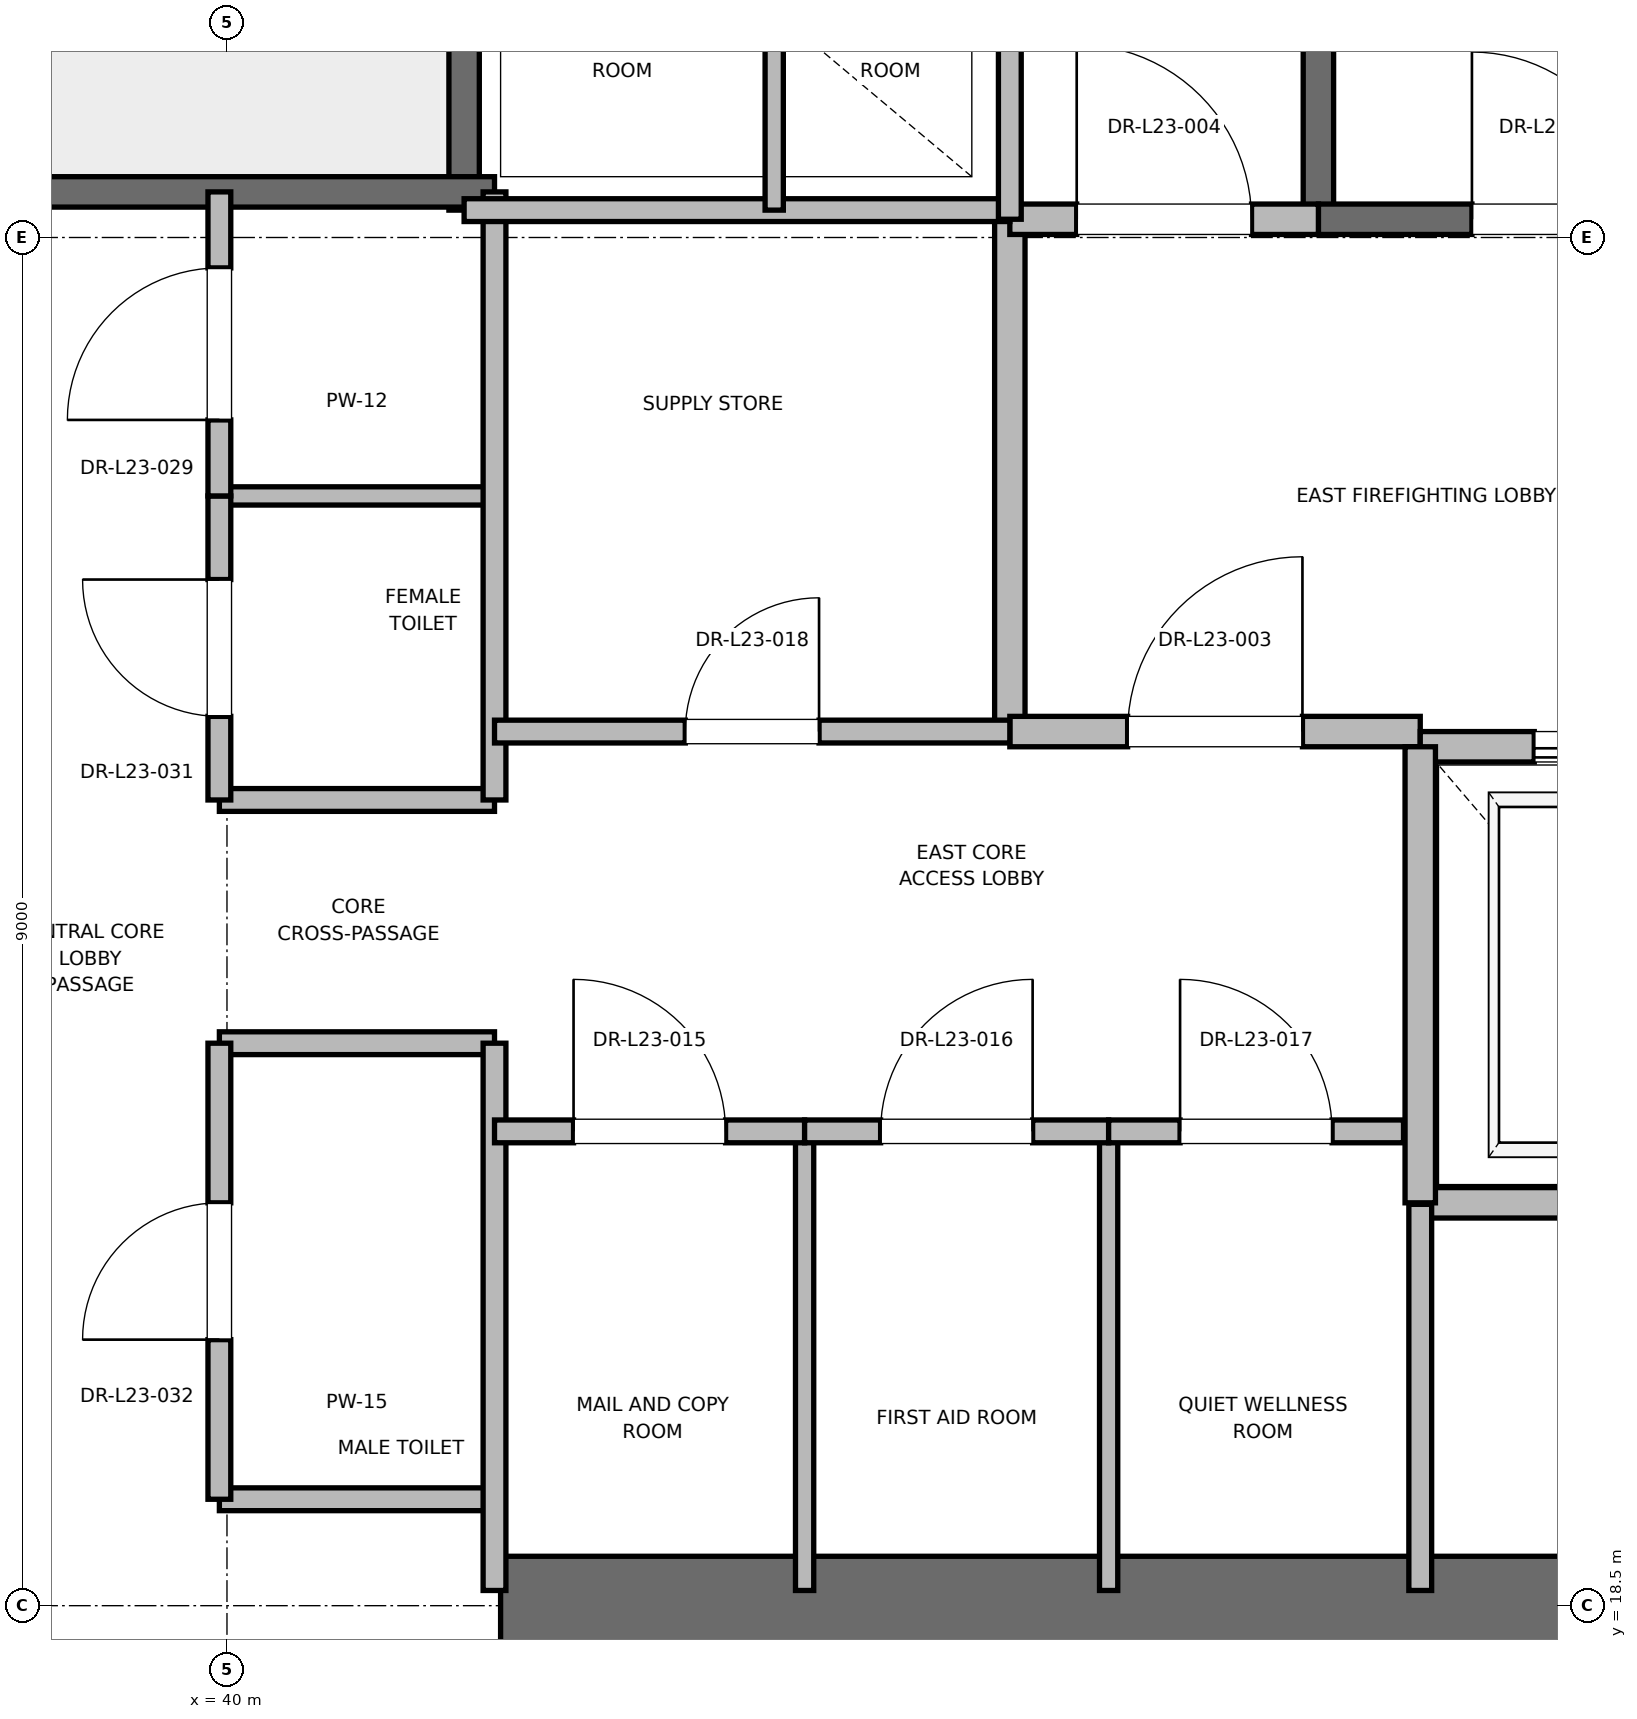
"""IFC4 building model, lengths in metres.
Left out: names, types, materials, properties, quantities, classifications, styles, units other than length and angle.
Written with IfcOpenShell. Run it as: python <this file> out.ifc"""

import sys

from ifc_helpers import new_model, si_unit, direction, frame, frame_2d, origin, place, context, subcontext, project, spatial, rectangle, extrude, element, fill, save


model = new_model("IFC4")
c1 = context("Model", 3, precision=1e-05, world=origin(), true_north=direction((0.0, 1.0)))
c2 = subcontext(c1, "Body", "Model", "MODEL_VIEW")
j1 = project(units=[si_unit("LENGTHUNIT", "METRE"), si_unit("PLANEANGLEUNIT", "RADIAN")], contexts=[c1])
p1 = place(None, origin())
s1 = spatial("IfcSite", under=j1, at=p1, CompositionType="ELEMENT")
p2 = place(p1, origin())
s2 = spatial("IfcBuilding", under=s1, at=p2, CompositionType="ELEMENT")
p3 = place(p2, frame((0.0, 0.0, 99.6)))
s3 = spatial("IfcBuildingStorey", under=s2, at=p3, CompositionType="ELEMENT", Elevation=99.6)
p4 = place(p3, frame((41.8, 18.5, 0.0), z_axis=(0.0, 0.0, 1.0), x_axis=(1.0, 0.0, 0.0)))
e1 = element("IfcWall", 1, at=p4, inside=s3, PredefinedType="SHEAR", context=c2, shape_type="SweptSolid", body=[
    extrude(rectangle(XDim=9.2, YDim=0.65, at=frame_2d((4.6, 0.0))), origin(), (0.0, 0.0, 1.0), 3.76),
])
p5 = place(p3, frame((47.18, 27.62, 0.0), z_axis=(0.0, 0.0, 1.0), x_axis=(0.0, 1.0, 0.0)))
e2 = element("IfcWall", 2, at=p5, inside=s3, PredefinedType="SOLIDWALL", context=c2, shape_type="SweptSolid", body=[
    extrude(rectangle(XDim=8.18, YDim=0.2, at=frame_2d((4.09, 0.0))), origin(), (0.0, 0.0, 1.0), 3.76),
])
p6 = place(p3, frame((47.18, 27.62, 0.0), z_axis=(0.0, 0.0, 1.0), x_axis=(1.0, 0.0, 0.0)))
e3 = element("IfcWall", 3, at=p6, inside=s3, PredefinedType="SOLIDWALL", context=c2, shape_type="SweptSolid", body=[
    extrude(rectangle(XDim=3.12, YDim=0.2, at=frame_2d((1.56, 0.0))), origin(), (0.0, 0.0, 1.0), 3.76),
])
p7 = place(p6, frame((1.01, 0.0, 0.0)))
e4 = element("IfcOpeningElement", 4, at=p7, cuts=e3, PredefinedType="OPENING", context=c2, shape_type="SweptSolid", body=[
    extrude(rectangle(XDim=1.1, YDim=2.15, at=frame_2d((0.55, 1.075))), frame((0.0, 0.1, 0.0), z_axis=(0.0, -1.0, 0.0), x_axis=(1.0, 0.0, 0.0)), (0.0, 0.0, 1.0), 0.2),
])
p8 = place(p3, frame((41.56, 27.68, 0.0), z_axis=(0.0, 0.0, 1.0), x_axis=(0.0, 1.0, 0.0)))
e5 = element("IfcWall", 5, at=p8, inside=s3, PredefinedType="SOLIDWALL", context=c2, shape_type="SweptSolid", body=[
    extrude(rectangle(XDim=8.57, YDim=0.2, at=frame_2d((4.285, 0.0))), origin(), (0.0, 0.0, 1.0), 3.76),
])
p9 = place(p3, frame((38.44, 27.8, 0.0), z_axis=(0.0, 0.0, 1.0), x_axis=(1.0, 0.0, 0.0)))
e6 = element("IfcWall", 6, at=p9, inside=s3, PredefinedType="SOLIDWALL", context=c2, shape_type="SweptSolid", body=[
    extrude(rectangle(XDim=3.32, YDim=0.2, at=frame_2d((1.66, 0.0))), origin(), (0.0, 0.0, 1.0), 3.76),
])
p10 = place(p3, frame((45.15, 24.25, 0.0), z_axis=(0.0, 0.0, 1.0), x_axis=(0.0, 1.0, 0.0)))
e7 = element("IfcWall", 7, at=p10, inside=s3, PredefinedType="PARTITIONING", context=c2, shape_type="SweptSolid", body=[
    extrude(rectangle(XDim=3.37, YDim=0.2, at=frame_2d((1.685, 0.0))), origin(), (0.0, 0.0, 1.0), 3.76),
])
p11 = place(p3, frame((45.15, 24.25, 0.0), z_axis=(0.0, 0.0, 1.0), x_axis=(1.0, 0.0, 0.0)))
e8 = element("IfcWall", 8, at=p11, inside=s3, PredefinedType="PARTITIONING", context=c2, shape_type="SweptSolid", body=[
    extrude(rectangle(XDim=2.7, YDim=0.2, at=frame_2d((1.35, 0.0))), origin(), (0.0, 0.0, 1.0), 3.76),
])
p12 = place(p11, frame((0.775, 0.0, 0.0)))
e9 = element("IfcOpeningElement", 9, at=p12, cuts=e8, PredefinedType="OPENING", context=c2, shape_type="SweptSolid", body=[
    extrude(rectangle(XDim=1.15, YDim=2.2, at=frame_2d((0.575, 1.1))), frame((0.0, 0.1, 0.0), z_axis=(0.0, -1.0, 0.0), x_axis=(1.0, 0.0, 0.0)), (0.0, 0.0, 1.0), 0.2),
])
p13 = place(p3, frame((45.15, 27.62, 0.0), z_axis=(0.0, 0.0, 1.0), x_axis=(1.0, 0.0, 0.0)))
e10 = element("IfcWall", 10, at=p13, inside=s3, PredefinedType="PARTITIONING", context=c2, shape_type="SweptSolid", body=[
    extrude(rectangle(XDim=2.03, YDim=0.2, at=frame_2d((1.015, 0.0))), origin(), (0.0, 0.0, 1.0), 3.76),
])
p14 = place(p13, frame((0.44, 0.0, 0.0)))
e11 = element("IfcOpeningElement", 11, at=p14, cuts=e10, PredefinedType="OPENING", context=c2, shape_type="SweptSolid", body=[
    extrude(rectangle(XDim=1.15, YDim=2.2, at=frame_2d((0.575, 1.1))), frame((0.0, 0.1, 0.0), z_axis=(0.0, -1.0, 0.0), x_axis=(1.0, 0.0, 0.0)), (0.0, 0.0, 1.0), 0.2),
])
p15 = place(p3, frame((47.85, 21.15, 0.0), z_axis=(0.0, 0.0, 1.0), x_axis=(1.0, 0.0, 0.0)))
e12 = element("IfcWall", 12, at=p15, inside=s3, PredefinedType="SOLIDWALL", context=c2, shape_type="SweptSolid", body=[
    extrude(rectangle(XDim=2.6, YDim=0.2, at=frame_2d((1.3, 0.0))), origin(), (0.0, 0.0, 1.0), 3.76),
])
p16 = place(p3, frame((50.45, 24.15, 0.0), z_axis=(0.0, 0.0, 1.0), x_axis=(-1.0, 0.0, 0.0)))
e13 = element("IfcWall", 13, at=p16, inside=s3, PredefinedType="SOLIDWALL", context=c2, shape_type="SweptSolid", body=[
    extrude(rectangle(XDim=2.6, YDim=0.2, at=frame_2d((1.3, 0.0))), origin(), (0.0, 0.0, 1.0), 2.54),
])
p17 = place(p16, frame((0.75, 0.0, 0.0)))
e14 = element("IfcOpeningElement", 14, at=p17, cuts=e13, PredefinedType="OPENING", context=c2, shape_type="SweptSolid", body=[
    extrude(rectangle(XDim=1.1, YDim=2.2, at=frame_2d((0.55, 1.1))), frame((0.0, 0.1, 0.0), z_axis=(0.0, -1.0, 0.0), x_axis=(1.0, 0.0, 0.0)), (0.0, 0.0, 1.0), 0.2),
])
p18 = place(p3, frame((47.85, 24.15, 0.0), z_axis=(0.0, 0.0, 1.0), x_axis=(0.0, -1.0, 0.0)))
e15 = element("IfcWall", 15, at=p18, inside=s3, PredefinedType="SOLIDWALL", context=c2, shape_type="SweptSolid", body=[
    extrude(rectangle(XDim=3.0, YDim=0.2, at=frame_2d((1.5, 0.0))), origin(), (0.0, 0.0, 1.0), 3.76),
])
for number, where, z_axis, x_axis in (
    (16, (39.95, 19.2, 0.0), (0.0, 0.0, 1.0), (1.0, 0.0, 0.0)),
    (17, (39.95, 22.2, 0.0), (0.0, 0.0, 1.0), (1.0, 0.0, 0.0)),
    (18, (39.95, 23.8, 0.0), (0.0, 0.0, 1.0), (1.0, 0.0, 0.0)),
):
    element("IfcWall", number, at=place(p3, frame(where, z_axis=z_axis, x_axis=x_axis)), inside=s3, PredefinedType="PARTITIONING", context=c2, shape_type="SweptSolid", body=[
        extrude(rectangle(XDim=1.81, YDim=0.15, at=frame_2d((0.905, 0.0))), origin(), (0.0, 0.0, 1.0), 2.85),
    ])
p19 = place(p3, frame((39.95, 25.8, 0.0), z_axis=(0.0, 0.0, 1.0), x_axis=(1.0, 0.0, 0.0)))
e19 = element("IfcWall", 19, at=p19, inside=s3, PredefinedType="PARTITIONING", context=c2, shape_type="SweptSolid", body=[
    extrude(rectangle(XDim=1.81, YDim=0.12, at=frame_2d((0.905, 0.0))), origin(), (0.0, 0.0, 1.0), 2.85),
])
p20 = place(p3, frame((41.76, 18.6, 0.0), z_axis=(0.0, 0.0, 1.0), x_axis=(0.0, 1.0, 0.0)))
e20 = element("IfcWall", 20, at=p20, inside=s3, PredefinedType="PARTITIONING", context=c2, shape_type="SweptSolid", body=[
    extrude(rectangle(XDim=3.6, YDim=0.15, at=frame_2d((1.8, 0.0))), origin(), (0.0, 0.0, 1.0), 2.54),
])
p21 = place(p3, frame((41.76, 23.8, 0.0), z_axis=(0.0, 0.0, 1.0), x_axis=(0.0, 1.0, 0.0)))
e21 = element("IfcWall", 21, at=p21, inside=s3, PredefinedType="PARTITIONING", context=c2, shape_type="SweptSolid", body=[
    extrude(rectangle(XDim=4.0, YDim=0.15, at=frame_2d((2.0, 0.0))), origin(), (0.0, 0.0, 1.0), 2.85),
])
p22 = place(p3, frame((39.95, 19.2, 0.0), z_axis=(0.0, 0.0, 1.0), x_axis=(0.0, 1.0, 0.0)))
e22 = element("IfcWall", 22, at=p22, inside=s3, PredefinedType="PARTITIONING", context=c2, shape_type="SweptSolid", body=[
    extrude(rectangle(XDim=3.0, YDim=0.15, at=frame_2d((1.5, 0.0))), origin(), (0.0, 0.0, 1.0), 2.85),
])
p23 = place(p22, frame((1.05, 0.0, 0.0)))
e23 = element("IfcOpeningElement", 23, at=p23, cuts=e22, PredefinedType="OPENING", context=c2, shape_type="SweptSolid", body=[
    extrude(rectangle(XDim=0.9, YDim=2.1, at=frame_2d((0.45, 1.05))), frame((0.0, 0.075, 0.0), z_axis=(0.0, -1.0, 0.0), x_axis=(1.0, 0.0, 0.0)), (0.0, 0.0, 1.0), 0.15),
])
p24 = place(p3, frame((39.95, 23.8, 0.0), z_axis=(0.0, 0.0, 1.0), x_axis=(0.0, 1.0, 0.0)))
e24 = element("IfcWall", 24, at=p24, inside=s3, PredefinedType="PARTITIONING", context=c2, shape_type="SweptSolid", body=[
    extrude(rectangle(XDim=2.0, YDim=0.15, at=frame_2d((1.0, 0.0))), origin(), (0.0, 0.0, 1.0), 2.85),
])
p25 = place(p24, frame((0.55, 0.0, 0.0)))
e25 = element("IfcOpeningElement", 25, at=p25, cuts=e24, PredefinedType="OPENING", context=c2, shape_type="SweptSolid", body=[
    extrude(rectangle(XDim=0.9, YDim=2.1, at=frame_2d((0.45, 1.05))), frame((0.0, 0.075, 0.0), z_axis=(0.0, -1.0, 0.0), x_axis=(1.0, 0.0, 0.0)), (0.0, 0.0, 1.0), 0.15),
])
p26 = place(p3, frame((39.95, 25.8, 0.0), z_axis=(0.0, 0.0, 1.0), x_axis=(0.0, 1.0, 0.0)))
e26 = element("IfcWall", 26, at=p26, inside=s3, PredefinedType="PARTITIONING", context=c2, shape_type="SweptSolid", body=[
    extrude(rectangle(XDim=2.0, YDim=0.15, at=frame_2d((1.0, 0.0))), origin(), (0.0, 0.0, 1.0), 2.85),
])
p27 = place(p26, frame((0.5, 0.0, 0.0)))
e27 = element("IfcOpeningElement", 27, at=p27, cuts=e26, PredefinedType="OPENING", context=c2, shape_type="SweptSolid", body=[
    extrude(rectangle(XDim=1.0, YDim=2.15, at=frame_2d((0.5, 1.075))), frame((0.0, 0.075, 0.0), z_axis=(0.0, -1.0, 0.0), x_axis=(1.0, 0.0, 0.0)), (0.0, 0.0, 1.0), 0.15),
])
p28 = place(p3, frame((41.56, 27.68, 0.0), z_axis=(0.0, 0.0, 1.0), x_axis=(1.0, 0.0, 0.0)))
e28 = element("IfcWall", 28, at=p28, inside=s3, PredefinedType="PARTITIONING", context=c2, shape_type="SweptSolid", body=[
    extrude(rectangle(XDim=3.59, YDim=0.15, at=frame_2d((1.795, 0.0))), origin(), (0.0, 0.0, 1.0), 2.85),
])
p29 = place(p3, frame((47.85, 18.6, 0.0), z_axis=(0.0, 0.0, 1.0), x_axis=(0.0, 1.0, 0.0)))
e29 = element("IfcWall", 29, at=p29, inside=s3, PredefinedType="PARTITIONING", context=c2, shape_type="SweptSolid", body=[
    extrude(rectangle(XDim=2.54, YDim=0.15, at=frame_2d((1.27, 0.0))), origin(), (0.0, 0.0, 1.0), 2.85),
])
for number, where, z_axis, x_axis in (
    (30, (43.8, 18.6, 0.0), (0.0, 0.0, 1.0), (0.0, 1.0, 0.0)),
    (31, (45.8, 18.6, 0.0), (0.0, 0.0, 1.0), (0.0, 1.0, 0.0)),
):
    element("IfcWall", number, at=place(p3, frame(where, z_axis=z_axis, x_axis=x_axis)), inside=s3, PredefinedType="PARTITIONING", context=c2, shape_type="SweptSolid", body=[
        extrude(rectangle(XDim=3.02, YDim=0.12, at=frame_2d((1.51, 0.0))), origin(), (0.0, 0.0, 1.0), 2.85),
    ])
p30 = place(p3, frame((41.76, 21.62, 0.0), z_axis=(0.0, 0.0, 1.0), x_axis=(1.0, 0.0, 0.0)))
e32 = element("IfcWall", 32, at=p30, inside=s3, PredefinedType="PARTITIONING", context=c2, shape_type="SweptSolid", body=[
    extrude(rectangle(XDim=2.04, YDim=0.15, at=frame_2d((1.02, 0.0))), origin(), (0.0, 0.0, 1.0), 2.85),
])
p31 = place(p30, frame((0.52, 0.0, 0.0)))
e33 = element("IfcOpeningElement", 33, at=p31, cuts=e32, PredefinedType="OPENING", context=c2, shape_type="SweptSolid", body=[
    extrude(rectangle(XDim=1.0, YDim=2.15, at=frame_2d((0.5, 1.075))), frame((0.0, 0.075, 0.0), z_axis=(0.0, -1.0, 0.0), x_axis=(1.0, 0.0, 0.0)), (0.0, 0.0, 1.0), 0.15),
])
p32 = place(p3, frame((43.8, 21.62, 0.0), z_axis=(0.0, 0.0, 1.0), x_axis=(1.0, 0.0, 0.0)))
e34 = element("IfcWall", 34, at=p32, inside=s3, PredefinedType="PARTITIONING", context=c2, shape_type="SweptSolid", body=[
    extrude(rectangle(XDim=2.0, YDim=0.15, at=frame_2d((1.0, 0.0))), origin(), (0.0, 0.0, 1.0), 2.85),
])
p33 = place(p32, frame((0.5, 0.0, 0.0)))
e35 = element("IfcOpeningElement", 35, at=p33, cuts=e34, PredefinedType="OPENING", context=c2, shape_type="SweptSolid", body=[
    extrude(rectangle(XDim=1.0, YDim=2.15, at=frame_2d((0.5, 1.075))), frame((0.0, 0.075, 0.0), z_axis=(0.0, -1.0, 0.0), x_axis=(1.0, 0.0, 0.0)), (0.0, 0.0, 1.0), 0.15),
])
p34 = place(p3, frame((45.8, 21.62, 0.0), z_axis=(0.0, 0.0, 1.0), x_axis=(1.0, 0.0, 0.0)))
e36 = element("IfcWall", 36, at=p34, inside=s3, PredefinedType="PARTITIONING", context=c2, shape_type="SweptSolid", body=[
    extrude(rectangle(XDim=1.94, YDim=0.15, at=frame_2d((0.97, 0.0))), origin(), (0.0, 0.0, 1.0), 2.85),
])
p35 = place(p34, frame((0.47, 0.0, 0.0)))
e37 = element("IfcOpeningElement", 37, at=p35, cuts=e36, PredefinedType="OPENING", context=c2, shape_type="SweptSolid", body=[
    extrude(rectangle(XDim=1.0, YDim=2.15, at=frame_2d((0.5, 1.075))), frame((0.0, 0.075, 0.0), z_axis=(0.0, -1.0, 0.0), x_axis=(1.0, 0.0, 0.0)), (0.0, 0.0, 1.0), 0.15),
])
p36 = place(p3, frame((41.76, 24.25, 0.0), z_axis=(0.0, 0.0, 1.0), x_axis=(1.0, 0.0, 0.0)))
e38 = element("IfcWall", 38, at=p36, inside=s3, PredefinedType="PARTITIONING", context=c2, shape_type="SweptSolid", body=[
    extrude(rectangle(XDim=3.39, YDim=0.15, at=frame_2d((1.695, 0.0))), origin(), (0.0, 0.0, 1.0), 2.85),
])
p37 = place(p36, frame((1.255, 0.0, 0.0)))
e39 = element("IfcOpeningElement", 39, at=p37, cuts=e38, PredefinedType="OPENING", context=c2, shape_type="SweptSolid", body=[
    extrude(rectangle(XDim=0.88, YDim=2.1, at=frame_2d((0.44, 1.05))), frame((0.0, 0.075, 0.0), z_axis=(0.0, -1.0, 0.0), x_axis=(1.0, 0.0, 0.0)), (0.0, 0.0, 1.0), 0.15),
])
p38 = place(p3, frame((45.15, 27.62, 0.0), z_axis=(0.0, 0.0, 1.0), x_axis=(0.0, 1.0, 0.0)))
e40 = element("IfcWall", 40, at=p38, inside=s3, PredefinedType="PARTITIONING", context=c2, shape_type="SweptSolid", body=[
    extrude(rectangle(XDim=3.1, YDim=0.15, at=frame_2d((1.55, 0.0))), origin(), (0.0, 0.0, 1.0), 2.85),
])
p39 = place(p3, frame((43.6, 27.68, 0.0), z_axis=(0.0, 0.0, 1.0), x_axis=(0.0, 1.0, 0.0)))
e41 = element("IfcWall", 41, at=p39, inside=s3, PredefinedType="PARTITIONING", context=c2, shape_type="SweptSolid", body=[
    extrude(rectangle(XDim=3.04, YDim=0.12, at=frame_2d((1.52, 0.0))), origin(), (0.0, 0.0, 1.0), 2.85),
])
p40 = place(p7, origin())
e42 = element("IfcDoor", 42, at=p40, inside=s3, OperationType="SINGLE_SWING_LEFT", PredefinedType="DOOR", context=c2, shape_type="SweptSolid", body=[
    extrude(rectangle(XDim=1.1, YDim=2.15, at=frame_2d((0.55, 1.075))), frame((0.0, 0.025, 0.0), z_axis=(0.0, -1.0, 0.0), x_axis=(1.0, 0.0, 0.0)), (0.0, 0.0, 1.0), 0.05),
])
fill(e4, e42)
p41 = place(p12, origin())
e43 = element("IfcDoor", 43, at=p41, inside=s3, OperationType="SINGLE_SWING_RIGHT", PredefinedType="DOOR", context=c2, shape_type="SweptSolid", body=[
    extrude(rectangle(XDim=1.15, YDim=2.2, at=frame_2d((0.575, 1.1))), frame((0.0, 0.025, 0.0), z_axis=(0.0, -1.0, 0.0), x_axis=(1.0, 0.0, 0.0)), (0.0, 0.0, 1.0), 0.05),
])
fill(e9, e43)
p42 = place(p14, origin())
e44 = element("IfcDoor", 44, at=p42, inside=s3, OperationType="SINGLE_SWING_LEFT", PredefinedType="DOOR", context=c2, shape_type="SweptSolid", body=[
    extrude(rectangle(XDim=1.15, YDim=2.2, at=frame_2d((0.575, 1.1))), frame((0.0, 0.025, 0.0), z_axis=(0.0, -1.0, 0.0), x_axis=(1.0, 0.0, 0.0)), (0.0, 0.0, 1.0), 0.05),
])
fill(e11, e44)
p43 = place(p17, origin())
e45 = element("IfcDoor", 45, at=p43, inside=s3, OperationType="SLIDING_TO_RIGHT", PredefinedType="DOOR", context=c2, shape_type="SweptSolid", body=[
    extrude(rectangle(XDim=1.1, YDim=2.2, at=frame_2d((0.55, 1.1))), frame((0.0, 0.025, 0.0), z_axis=(0.0, -1.0, 0.0), x_axis=(1.0, 0.0, 0.0)), (0.0, 0.0, 1.0), 0.05),
])
fill(e14, e45)
p44 = place(p23, origin())
e46 = element("IfcDoor", 46, at=p44, inside=s3, OperationType="SINGLE_SWING_LEFT", PredefinedType="DOOR", context=c2, shape_type="SweptSolid", body=[
    extrude(rectangle(XDim=0.9, YDim=2.1, at=frame_2d((0.45, 1.05))), frame((0.0, 0.025, 0.0), z_axis=(0.0, -1.0, 0.0), x_axis=(1.0, 0.0, 0.0)), (0.0, 0.0, 1.0), 0.05),
])
fill(e23, e46)
p45 = place(p25, origin())
e47 = element("IfcDoor", 47, at=p45, inside=s3, OperationType="SINGLE_SWING_RIGHT", PredefinedType="DOOR", context=c2, shape_type="SweptSolid", body=[
    extrude(rectangle(XDim=0.9, YDim=2.1, at=frame_2d((0.45, 1.05))), frame((0.0, 0.025, 0.0), z_axis=(0.0, -1.0, 0.0), x_axis=(1.0, 0.0, 0.0)), (0.0, 0.0, 1.0), 0.05),
])
fill(e25, e47)
p46 = place(p27, origin())
e48 = element("IfcDoor", 48, at=p46, inside=s3, OperationType="SINGLE_SWING_LEFT", PredefinedType="DOOR", context=c2, shape_type="SweptSolid", body=[
    extrude(rectangle(XDim=1.0, YDim=2.15, at=frame_2d((0.5, 1.075))), frame((0.0, 0.025, 0.0), z_axis=(0.0, -1.0, 0.0), x_axis=(1.0, 0.0, 0.0)), (0.0, 0.0, 1.0), 0.05),
])
fill(e27, e48)
p47 = place(p31, origin())
e49 = element("IfcDoor", 49, at=p47, inside=s3, OperationType="SINGLE_SWING_LEFT", PredefinedType="DOOR", context=c2, shape_type="SweptSolid", body=[
    extrude(rectangle(XDim=1.0, YDim=2.15, at=frame_2d((0.5, 1.075))), frame((0.0, 0.025, 0.0), z_axis=(0.0, -1.0, 0.0), x_axis=(1.0, 0.0, 0.0)), (0.0, 0.0, 1.0), 0.05),
])
fill(e33, e49)
p48 = place(p33, origin())
e50 = element("IfcDoor", 50, at=p48, inside=s3, OperationType="SINGLE_SWING_RIGHT", PredefinedType="DOOR", context=c2, shape_type="SweptSolid", body=[
    extrude(rectangle(XDim=1.0, YDim=2.15, at=frame_2d((0.5, 1.075))), frame((0.0, 0.025, 0.0), z_axis=(0.0, -1.0, 0.0), x_axis=(1.0, 0.0, 0.0)), (0.0, 0.0, 1.0), 0.05),
])
fill(e35, e50)
p49 = place(p35, origin())
e51 = element("IfcDoor", 51, at=p49, inside=s3, OperationType="SINGLE_SWING_LEFT", PredefinedType="DOOR", context=c2, shape_type="SweptSolid", body=[
    extrude(rectangle(XDim=1.0, YDim=2.15, at=frame_2d((0.5, 1.075))), frame((0.0, 0.025, 0.0), z_axis=(0.0, -1.0, 0.0), x_axis=(1.0, 0.0, 0.0)), (0.0, 0.0, 1.0), 0.05),
])
fill(e37, e51)
p50 = place(p37, origin())
e52 = element("IfcDoor", 52, at=p50, inside=s3, OperationType="SINGLE_SWING_RIGHT", PredefinedType="DOOR", context=c2, shape_type="SweptSolid", body=[
    extrude(rectangle(XDim=0.88, YDim=2.1, at=frame_2d((0.44, 1.05))), frame((0.0, 0.025, 0.0), z_axis=(0.0, -1.0, 0.0), x_axis=(1.0, 0.0, 0.0)), (0.0, 0.0, 1.0), 0.05),
])
fill(e39, e52)
save(model, sys.argv[1])
